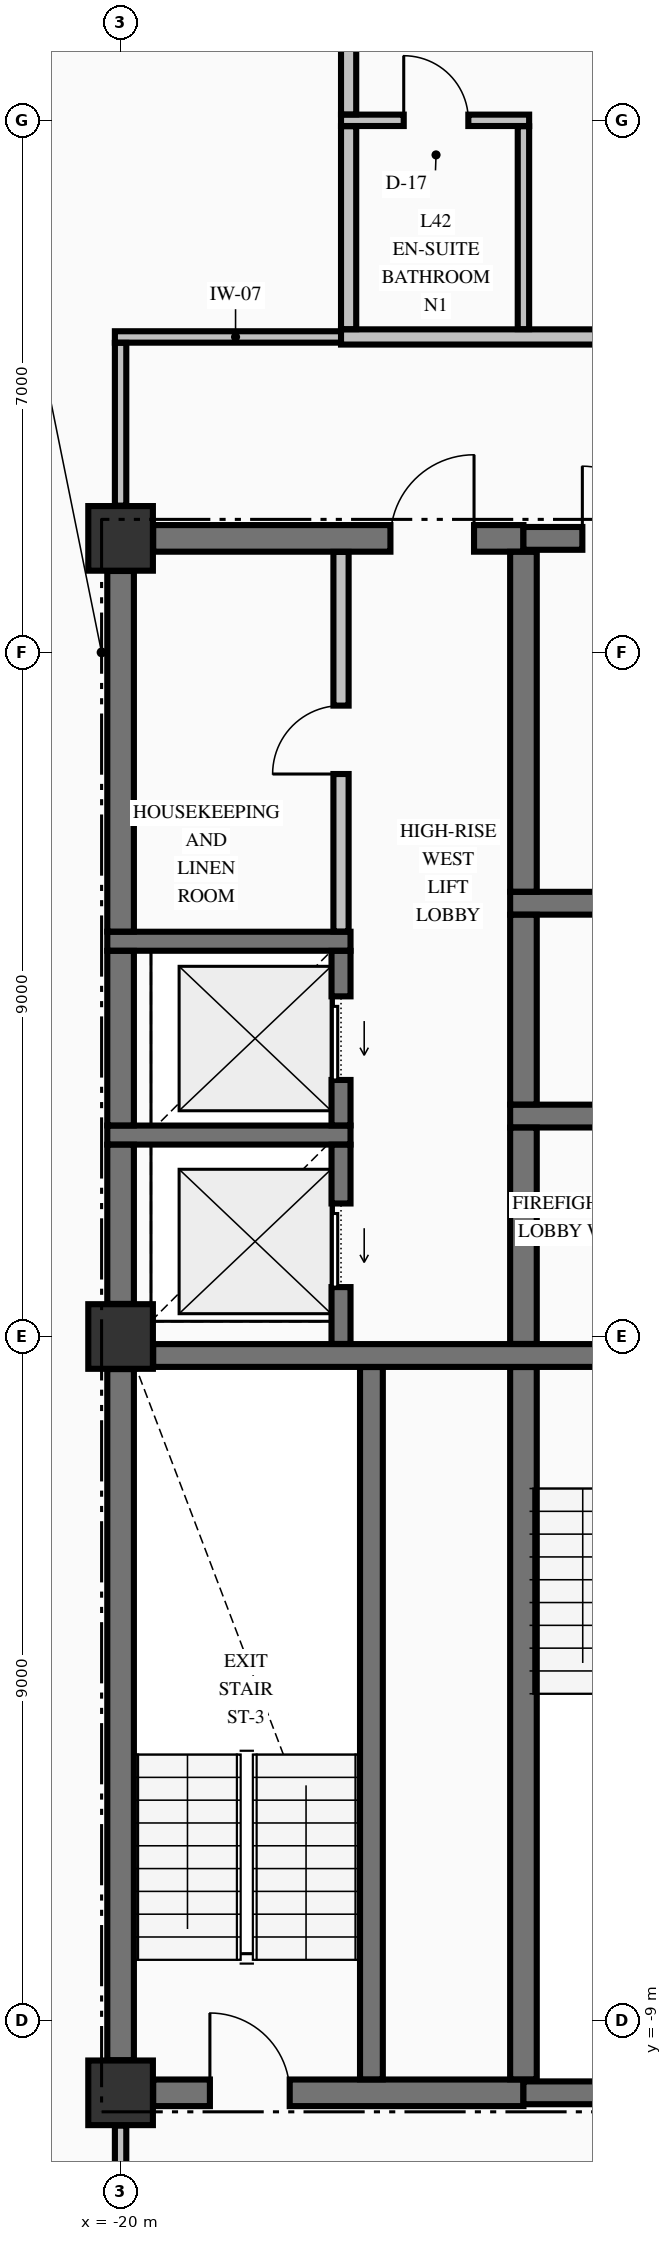
"""IFC4 building model, lengths in metres.
Left out: names, types, materials, properties, quantities, classifications, styles, units other than length and angle.
Written with IfcOpenShell. Run it as: python <this file> out.ifc"""

import sys

from ifc_helpers import new_model, si_unit, direction, frame, frame_2d, origin, origin_2d, place, context, subcontext, project, spatial, rectangle, extrude, element, fill, save


model = new_model("IFC4")
c1 = context("Model", 3, precision=1e-05, world=origin(), true_north=direction((0.0, 1.0)))
c2 = subcontext(c1, "Body", "Model", "MODEL_VIEW")
j1 = project(units=[si_unit("LENGTHUNIT", "METRE"), si_unit("PLANEANGLEUNIT", "RADIAN")], contexts=[c1])
p1 = place(None, origin())
s1 = spatial("IfcSite", under=j1, at=p1, CompositionType="ELEMENT")
p2 = place(p1, origin())
s2 = spatial("IfcBuilding", under=s1, at=p2, CompositionType="ELEMENT")
p3 = place(p2, frame((0.0, 0.0, 166.06)))
s3 = spatial("IfcBuildingStorey", under=s2, at=p3, CompositionType="ELEMENT", Elevation=166.06)
for number, where, z_axis, x_axis in (
    (1, (-20.0, -9.95, -0.25), (0.0, 0.0, 1.0), (1.0, 0.0, 0.0)),
    (2, (-20.0, 10.5, -0.25), (0.0, 0.0, 1.0), (1.0, 0.0, 0.0)),
    (3, (-20.0, 0.0, -0.25), (0.0, 0.0, 1.0), (1.0, 0.0, 0.0)),
):
    element("IfcColumn", number, at=place(p3, frame(where, z_axis=z_axis, x_axis=x_axis)), inside=s3, PredefinedType="COLUMN", context=c2, shape_type="SweptSolid", body=[
        extrude(rectangle(XDim=0.85, YDim=0.85, at=origin_2d()), origin(), (0.0, 0.0, 1.0), 3.4),
    ])
p4 = place(p3, frame((-19.571, -9.95, 0.0), z_axis=(0.0, 0.0, 1.0), x_axis=(1.0, 0.0, 0.0)))
e4 = element("IfcWall", 4, at=p4, inside=s3, PredefinedType="SHEAR", context=c2, shape_type="SweptSolid", body=[
    extrude(rectangle(XDim=4.871, YDim=0.35, at=frame_2d((2.436, 0.0))), origin(), (0.0, 0.0, 1.0), 3.15),
])
p5 = place(p4, frame((0.746, 0.0, 0.0)))
e5 = element("IfcOpeningElement", 5, at=p5, cuts=e4, PredefinedType="OPENING", context=c2, shape_type="SweptSolid", body=[
    extrude(rectangle(XDim=1.05, YDim=2.15, at=frame_2d((0.525, 1.075))), frame((0.0, 0.185, 0.0), z_axis=(0.0, -1.0, 0.0), x_axis=(1.0, 0.0, 0.0)), (0.0, 0.0, 1.0), 0.37),
])
p6 = place(p3, frame((-14.7, -9.95, 0.0), z_axis=(0.0, 0.0, 1.0), x_axis=(1.0, 0.0, 0.0)))
e6 = element("IfcWall", 6, at=p6, inside=s3, PredefinedType="SHEAR", context=c2, shape_type="SweptSolid", body=[
    extrude(rectangle(XDim=3.271, YDim=0.3, at=frame_2d((1.635, 0.0))), origin(), (0.0, 0.0, 1.0), 3.15),
])
p7 = place(p3, frame((-19.571, -0.25, 0.0), z_axis=(0.0, 0.0, 1.0), x_axis=(1.0, 0.0, 0.0)))
e7 = element("IfcWall", 7, at=p7, inside=s3, PredefinedType="SHEAR", context=c2, shape_type="SweptSolid", body=[
    extrude(rectangle(XDim=8.142, YDim=0.3, at=frame_2d((4.071, 0.0))), origin(), (0.0, 0.0, 1.0), 3.15),
])
p8 = place(p7, frame((5.871, 0.0, 0.0)))
e8 = element("IfcOpeningElement", 8, at=p8, cuts=e7, PredefinedType="OPENING", context=c2, shape_type="SweptSolid", body=[
    extrude(rectangle(XDim=1.1, YDim=2.15, at=frame_2d((0.55, 1.075))), frame((0.0, 0.16, 0.0), z_axis=(0.0, -1.0, 0.0), x_axis=(1.0, 0.0, 0.0)), (0.0, 0.0, 1.0), 0.32),
])
p9 = place(p3, frame((-20.175, 2.65, 0.0), z_axis=(0.0, 0.0, 1.0), x_axis=(1.0, 0.0, 0.0)))
e9 = element("IfcWall", 9, at=p9, inside=s3, PredefinedType="SOLIDWALL", context=c2, shape_type="SweptSolid", body=[
    extrude(rectangle(XDim=3.2, YDim=0.25, at=frame_2d((1.6, 0.0))), origin(), (0.0, 0.0, 1.0), 3.15),
])
p10 = place(p3, frame((-14.875, 2.9, 0.0), z_axis=(0.0, 0.0, 1.0), x_axis=(1.0, 0.0, 0.0)))
e10 = element("IfcWall", 10, at=p10, inside=s3, PredefinedType="SHEAR", context=c2, shape_type="SweptSolid", body=[
    extrude(rectangle(XDim=4.025, YDim=0.3, at=frame_2d((2.012, 0.0))), origin(), (0.0, 0.0, 1.0), 3.15),
])
p11 = place(p10, frame((2.075, 0.0, 0.0)))
e11 = element("IfcOpeningElement", 11, at=p11, cuts=e10, PredefinedType="OPENING", context=c2, shape_type="SweptSolid", body=[
    extrude(rectangle(XDim=1.1, YDim=2.2, at=frame_2d((0.55, 1.1))), frame((0.0, 0.16, 0.0), z_axis=(0.0, -1.0, 0.0), x_axis=(1.0, 0.0, 0.0)), (0.0, 0.0, 1.0), 0.32),
])
p12 = place(p3, frame((-20.175, 5.2, 0.0), z_axis=(0.0, 0.0, 1.0), x_axis=(1.0, 0.0, 0.0)))
e12 = element("IfcWall", 12, at=p12, inside=s3, PredefinedType="SOLIDWALL", context=c2, shape_type="SweptSolid", body=[
    extrude(rectangle(XDim=3.2, YDim=0.25, at=frame_2d((1.6, 0.0))), origin(), (0.0, 0.0, 1.0), 3.15),
])
p13 = place(p3, frame((-14.875, 5.7, 0.0), z_axis=(0.0, 0.0, 1.0), x_axis=(1.0, 0.0, 0.0)))
e13 = element("IfcWall", 13, at=p13, inside=s3, PredefinedType="SHEAR", context=c2, shape_type="SweptSolid", body=[
    extrude(rectangle(XDim=4.025, YDim=0.3, at=frame_2d((2.012, 0.0))), origin(), (0.0, 0.0, 1.0), 3.15),
])
p14 = place(p3, frame((-19.571, 10.5, 0.0), z_axis=(0.0, 0.0, 1.0), x_axis=(1.0, 0.0, 0.0)))
e14 = element("IfcWall", 14, at=p14, inside=s3, PredefinedType="SHEAR", context=c2, shape_type="SweptSolid", body=[
    extrude(rectangle(XDim=4.871, YDim=0.35, at=frame_2d((2.436, 0.0))), origin(), (0.0, 0.0, 1.0), 3.15),
])
p15 = place(p14, frame((3.121, 0.0, 0.0)))
e15 = element("IfcOpeningElement", 15, at=p15, cuts=e14, PredefinedType="OPENING", context=c2, shape_type="SweptSolid", body=[
    extrude(rectangle(XDim=1.1, YDim=2.15, at=frame_2d((0.55, 1.075))), frame((0.0, 0.185, 0.0), z_axis=(0.0, -1.0, 0.0), x_axis=(1.0, 0.0, 0.0)), (0.0, 0.0, 1.0), 0.37),
])
p16 = place(p3, frame((-14.7, 10.5, 0.0), z_axis=(0.0, 0.0, 1.0), x_axis=(1.0, 0.0, 0.0)))
e16 = element("IfcWall", 16, at=p16, inside=s3, PredefinedType="SHEAR", context=c2, shape_type="SweptSolid", body=[
    extrude(rectangle(XDim=3.271, YDim=0.3, at=frame_2d((1.635, 0.0))), origin(), (0.0, 0.0, 1.0), 3.15),
])
p17 = place(p16, frame((0.775, 0.0, 0.0)))
e17 = element("IfcOpeningElement", 17, at=p17, cuts=e16, PredefinedType="OPENING", context=c2, shape_type="SweptSolid", body=[
    extrude(rectangle(XDim=0.95, YDim=2.15, at=frame_2d((0.475, 1.075))), frame((0.0, 0.16, 0.0), z_axis=(0.0, -1.0, 0.0), x_axis=(1.0, 0.0, 0.0)), (0.0, 0.0, 1.0), 0.32),
])
p18 = place(p3, frame((-20.075, 13.15, 0.0), z_axis=(0.0, 0.0, 1.0), x_axis=(1.0, 0.0, 0.0)))
e18 = element("IfcWall", 18, at=p18, inside=s3, PredefinedType="PARTITIONING", context=c2, shape_type="SweptSolid", body=[
    extrude(rectangle(XDim=3.175, YDim=0.15, at=frame_2d((1.587, 0.0))), origin(), (0.0, 0.0, 1.0), 3.15),
])
p19 = place(p3, frame((-17.1, 13.15, 0.0), z_axis=(0.0, 0.0, 1.0), x_axis=(1.0, 0.0, 0.0)))
e19 = element("IfcWall", 19, at=p19, inside=s3, PredefinedType="PARTITIONING", context=c2, shape_type="SweptSolid", body=[
    extrude(rectangle(XDim=39.2, YDim=0.2, at=frame_2d((19.6, 0.0))), origin(), (0.0, 0.0, 1.0), 3.15),
])
p20 = place(p19, frame((3.575, 0.0, 0.0)))
e20 = element("IfcOpeningElement", 20, at=p20, cuts=e19, PredefinedType="OPENING", context=c2, shape_type="SweptSolid", body=[
    extrude(rectangle(XDim=0.95, YDim=2.15, at=frame_2d((0.475, 1.075))), frame((0.0, 0.11, 0.0), z_axis=(0.0, -1.0, 0.0), x_axis=(1.0, 0.0, 0.0)), (0.0, 0.0, 1.0), 0.22),
])
p21 = place(p19, frame((14.625, 0.0, 0.0)))
e21 = element("IfcOpeningElement", 21, at=p21, cuts=e19, PredefinedType="OPENING", context=c2, shape_type="SweptSolid", body=[
    extrude(rectangle(XDim=0.95, YDim=2.15, at=frame_2d((0.475, 1.075))), frame((0.0, 0.11, 0.0), z_axis=(0.0, -1.0, 0.0), x_axis=(1.0, 0.0, 0.0)), (0.0, 0.0, 1.0), 0.22),
])
p22 = place(p19, frame((21.125, 0.0, 0.0)))
e22 = element("IfcOpeningElement", 22, at=p22, cuts=e19, PredefinedType="OPENING", context=c2, shape_type="SweptSolid", body=[
    extrude(rectangle(XDim=0.95, YDim=2.15, at=frame_2d((0.475, 1.075))), frame((0.0, 0.11, 0.0), z_axis=(0.0, -1.0, 0.0), x_axis=(1.0, 0.0, 0.0)), (0.0, 0.0, 1.0), 0.22),
])
p23 = place(p19, frame((27.425, 0.0, 0.0)))
e23 = element("IfcOpeningElement", 23, at=p23, cuts=e19, PredefinedType="OPENING", context=c2, shape_type="SweptSolid", body=[
    extrude(rectangle(XDim=0.95, YDim=2.15, at=frame_2d((0.475, 1.075))), frame((0.0, 0.11, 0.0), z_axis=(0.0, -1.0, 0.0), x_axis=(1.0, 0.0, 0.0)), (0.0, 0.0, 1.0), 0.22),
])
p24 = place(p19, frame((34.605, 0.0, 0.0)))
e24 = element("IfcOpeningElement", 24, at=p24, cuts=e19, PredefinedType="OPENING", context=c2, shape_type="SweptSolid", body=[
    extrude(rectangle(XDim=0.95, YDim=2.15, at=frame_2d((0.475, 1.075))), frame((0.0, 0.11, 0.0), z_axis=(0.0, -1.0, 0.0), x_axis=(1.0, 0.0, 0.0)), (0.0, 0.0, 1.0), 0.22),
])
p25 = place(p3, frame((-17.1, 16.0, 0.0), z_axis=(0.0, 0.0, 1.0), x_axis=(1.0, 0.0, 0.0)))
e25 = element("IfcWall", 25, at=p25, inside=s3, PredefinedType="PARTITIONING", context=c2, shape_type="SweptSolid", body=[
    extrude(rectangle(XDim=2.475, YDim=0.15, at=frame_2d((1.238, 0.0))), origin(), (0.0, 0.0, 1.0), 3.15),
])
p26 = place(p25, frame((0.825, 0.0, 0.0)))
e26 = element("IfcOpeningElement", 26, at=p26, cuts=e25, PredefinedType="OPENING", context=c2, shape_type="SweptSolid", body=[
    extrude(rectangle(XDim=0.85, YDim=2.1, at=frame_2d((0.425, 1.05))), frame((0.0, 0.085, 0.0), z_axis=(0.0, -1.0, 0.0), x_axis=(1.0, 0.0, 0.0)), (0.0, 0.0, 1.0), 0.17),
])
p27 = place(p3, frame((-20.0, -9.521, 0.0), z_axis=(0.0, 0.0, 1.0), x_axis=(0.0, 1.0, 0.0)))
e27 = element("IfcWall", 27, at=p27, inside=s3, PredefinedType="SHEAR", context=c2, shape_type="SweptSolid", body=[
    extrude(rectangle(XDim=9.092, YDim=0.35, at=frame_2d((4.546, 0.0))), origin(), (0.0, 0.0, 1.0), 3.15),
])
p28 = place(p3, frame((-20.0, 0.429, 0.0), z_axis=(0.0, 0.0, 1.0), x_axis=(0.0, 1.0, 0.0)))
e28 = element("IfcWall", 28, at=p28, inside=s3, PredefinedType="SHEAR", context=c2, shape_type="SweptSolid", body=[
    extrude(rectangle(XDim=2.094, YDim=0.35, at=frame_2d((1.047, 0.0))), origin(), (0.0, 0.0, 1.0), 3.15),
])
p29 = place(p3, frame((-20.0, 2.777, 0.0), z_axis=(0.0, 0.0, 1.0), x_axis=(0.0, 1.0, 0.0)))
e29 = element("IfcWall", 29, at=p29, inside=s3, PredefinedType="SHEAR", context=c2, shape_type="SweptSolid", body=[
    extrude(rectangle(XDim=2.296, YDim=0.35, at=frame_2d((1.148, 0.0))), origin(), (0.0, 0.0, 1.0), 3.15),
])
p30 = place(p3, frame((-20.0, 5.327, 0.0), z_axis=(0.0, 0.0, 1.0), x_axis=(0.0, 1.0, 0.0)))
e30 = element("IfcWall", 30, at=p30, inside=s3, PredefinedType="SHEAR", context=c2, shape_type="SweptSolid", body=[
    extrude(rectangle(XDim=4.744, YDim=0.35, at=frame_2d((2.372, 0.0))), origin(), (0.0, 0.0, 1.0), 3.15),
])
p31 = place(p3, frame((-17.1, -0.098, 0.0), z_axis=(0.0, 0.0, 1.0), x_axis=(0.0, 1.0, 0.0)))
e31 = element("IfcWall", 31, at=p31, inside=s3, PredefinedType="SOLIDWALL", context=c2, shape_type="SweptSolid", body=[
    extrude(rectangle(XDim=2.621, YDim=0.25, at=frame_2d((1.311, 0.0))), origin(), (0.0, 0.0, 1.0), 3.15),
])
p32 = place(p31, frame((0.748, 0.0, 0.0)))
e32 = element("IfcOpeningElement", 32, at=p32, cuts=e31, PredefinedType="OPENING", context=c2, shape_type="SweptSolid", body=[
    extrude(rectangle(XDim=1.1, YDim=2.2, at=frame_2d((0.55, 1.1))), frame((0.0, 0.135, 0.0), z_axis=(0.0, -1.0, 0.0), x_axis=(1.0, 0.0, 0.0)), (0.0, 0.0, 1.0), 0.27),
])
p33 = place(p3, frame((-17.1, 2.777, 0.0), z_axis=(0.0, 0.0, 1.0), x_axis=(0.0, 1.0, 0.0)))
e33 = element("IfcWall", 33, at=p33, inside=s3, PredefinedType="SOLIDWALL", context=c2, shape_type="SweptSolid", body=[
    extrude(rectangle(XDim=2.296, YDim=0.25, at=frame_2d((1.148, 0.0))), origin(), (0.0, 0.0, 1.0), 3.15),
])
p34 = place(p33, frame((0.598, 0.0, 0.0)))
e34 = element("IfcOpeningElement", 34, at=p34, cuts=e33, PredefinedType="OPENING", context=c2, shape_type="SweptSolid", body=[
    extrude(rectangle(XDim=1.1, YDim=2.2, at=frame_2d((0.55, 1.1))), frame((0.0, 0.135, 0.0), z_axis=(0.0, -1.0, 0.0), x_axis=(1.0, 0.0, 0.0)), (0.0, 0.0, 1.0), 0.27),
])
p35 = place(p3, frame((-16.7, -9.773, 0.0), z_axis=(0.0, 0.0, 1.0), x_axis=(0.0, 1.0, 0.0)))
e35 = element("IfcWall", 35, at=p35, inside=s3, PredefinedType="SHEAR", context=c2, shape_type="SweptSolid", body=[
    extrude(rectangle(XDim=9.371, YDim=0.3, at=frame_2d((4.686, 0.0))), origin(), (0.0, 0.0, 1.0), 3.15),
])
p36 = place(p3, frame((-14.7, -9.773, 0.0), z_axis=(0.0, 0.0, 1.0), x_axis=(0.0, 1.0, 0.0)))
e36 = element("IfcWall", 36, at=p36, inside=s3, PredefinedType="SHEAR", context=c2, shape_type="SweptSolid", body=[
    extrude(rectangle(XDim=9.371, YDim=0.35, at=frame_2d((4.686, 0.0))), origin(), (0.0, 0.0, 1.0), 3.15),
])
p37 = place(p3, frame((-14.7, -0.098, 0.0), z_axis=(0.0, 0.0, 1.0), x_axis=(0.0, 1.0, 0.0)))
e37 = element("IfcWall", 37, at=p37, inside=s3, PredefinedType="SHEAR", context=c2, shape_type="SweptSolid", body=[
    extrude(rectangle(XDim=2.846, YDim=0.35, at=frame_2d((1.423, 0.0))), origin(), (0.0, 0.0, 1.0), 3.15),
])
p38 = place(p3, frame((-14.7, 3.052, 0.0), z_axis=(0.0, 0.0, 1.0), x_axis=(0.0, 1.0, 0.0)))
e38 = element("IfcWall", 38, at=p38, inside=s3, PredefinedType="SHEAR", context=c2, shape_type="SweptSolid", body=[
    extrude(rectangle(XDim=2.496, YDim=0.35, at=frame_2d((1.248, 0.0))), origin(), (0.0, 0.0, 1.0), 3.15),
])
p39 = place(p3, frame((-14.7, 5.852, 0.0), z_axis=(0.0, 0.0, 1.0), x_axis=(0.0, 1.0, 0.0)))
e39 = element("IfcWall", 39, at=p39, inside=s3, PredefinedType="SHEAR", context=c2, shape_type="SweptSolid", body=[
    extrude(rectangle(XDim=4.471, YDim=0.35, at=frame_2d((2.235, 0.0))), origin(), (0.0, 0.0, 1.0), 3.15),
])
p40 = place(p3, frame((-20.0, -12.222, 0.0), z_axis=(0.0, 0.0, 1.0), x_axis=(0.0, 1.0, 0.0)))
e40 = element("IfcWall", 40, at=p40, inside=s3, PredefinedType="PARTITIONING", context=c2, shape_type="SweptSolid", body=[
    extrude(rectangle(XDim=1.841, YDim=0.15, at=frame_2d((0.92, 0.0))), origin(), (0.0, 0.0, 1.0), 2.342),
])
p41 = place(p3, frame((-20.0, 10.931, 0.0), z_axis=(0.0, 0.0, 1.0), x_axis=(0.0, 1.0, 0.0)))
e41 = element("IfcWall", 41, at=p41, inside=s3, PredefinedType="PARTITIONING", context=c2, shape_type="SweptSolid", body=[
    extrude(rectangle(XDim=2.141, YDim=0.15, at=frame_2d((1.071, 0.0))), origin(), (0.0, 0.0, 1.0), 2.342),
])
p42 = place(p3, frame((-17.1, 5.328, 0.0), z_axis=(0.0, 0.0, 1.0), x_axis=(0.0, 1.0, 0.0)))
e42 = element("IfcWall", 42, at=p42, inside=s3, PredefinedType="PARTITIONING", context=c2, shape_type="SweptSolid", body=[
    extrude(rectangle(XDim=4.994, YDim=0.2, at=frame_2d((2.497, 0.0))), origin(), (0.0, 0.0, 1.0), 3.15),
])
p43 = place(p42, frame((2.072, 0.0, 0.0)))
e43 = element("IfcOpeningElement", 43, at=p43, cuts=e42, PredefinedType="OPENING", context=c2, shape_type="SweptSolid", body=[
    extrude(rectangle(XDim=0.9, YDim=2.15, at=frame_2d((0.45, 1.075))), frame((0.0, 0.11, 0.0), z_axis=(0.0, -1.0, 0.0), x_axis=(1.0, 0.0, 0.0)), (0.0, 0.0, 1.0), 0.22),
])
p44 = place(p3, frame((-17.0, 13.253, 0.0), z_axis=(0.0, 0.0, 1.0), x_axis=(0.0, 1.0, 0.0)))
e44 = element("IfcWall", 44, at=p44, inside=s3, PredefinedType="PARTITIONING", context=c2, shape_type="SweptSolid", body=[
    extrude(rectangle(XDim=2.669, YDim=0.2, at=frame_2d((1.334, 0.0))), origin(), (0.0, 0.0, 1.0), 3.15),
])
p45 = place(p3, frame((-17.0, 16.078, 0.0), z_axis=(0.0, 0.0, 1.0), x_axis=(0.0, 1.0, 0.0)))
e45 = element("IfcWall", 45, at=p45, inside=s3, PredefinedType="PARTITIONING", context=c2, shape_type="SweptSolid", body=[
    extrude(rectangle(XDim=2.916, YDim=0.2, at=frame_2d((1.458, 0.0))), origin(), (0.0, 0.0, 1.0), 3.15),
])
p46 = place(p3, frame((-14.7, 13.253, 0.0), z_axis=(0.0, 0.0, 1.0), x_axis=(0.0, 1.0, 0.0)))
e46 = element("IfcWall", 46, at=p46, inside=s3, PredefinedType="PARTITIONING", context=c2, shape_type="SweptSolid", body=[
    extrude(rectangle(XDim=2.669, YDim=0.15, at=frame_2d((1.334, 0.0))), origin(), (0.0, 0.0, 1.0), 3.15),
])
p47 = place(p17, origin())
e47 = element("IfcDoor", 47, at=p47, inside=s3, OperationType="SINGLE_SWING_LEFT", PredefinedType="DOOR", context=c2, shape_type="SweptSolid", body=[
    extrude(rectangle(XDim=0.95, YDim=2.15, at=frame_2d((0.475, 1.075))), frame((0.0, 0.025, 0.0), z_axis=(0.0, -1.0, 0.0), x_axis=(1.0, 0.0, 0.0)), (0.0, 0.0, 1.0), 0.05),
])
fill(e17, e47)
p48 = place(p5, origin())
e48 = element("IfcDoor", 48, at=p48, inside=s3, OperationType="SINGLE_SWING_LEFT", PredefinedType="DOOR", context=c2, shape_type="SweptSolid", body=[
    extrude(rectangle(XDim=1.05, YDim=2.15, at=frame_2d((0.525, 1.075))), frame((0.0, 0.025, 0.0), z_axis=(0.0, -1.0, 0.0), x_axis=(1.0, 0.0, 0.0)), (0.0, 0.0, 1.0), 0.05),
])
fill(e5, e48)
p49 = place(p32, origin())
e49 = element("IfcDoor", 49, at=p49, inside=s3, OperationType="SLIDING_TO_LEFT", PredefinedType="DOOR", context=c2, shape_type="SweptSolid", body=[
    extrude(rectangle(XDim=1.1, YDim=2.2, at=frame_2d((0.55, 1.1))), frame((0.0, 0.025, 0.0), z_axis=(0.0, -1.0, 0.0), x_axis=(1.0, 0.0, 0.0)), (0.0, 0.0, 1.0), 0.05),
])
fill(e32, e49)
p50 = place(p34, origin())
e50 = element("IfcDoor", 50, at=p50, inside=s3, OperationType="SLIDING_TO_LEFT", PredefinedType="DOOR", context=c2, shape_type="SweptSolid", body=[
    extrude(rectangle(XDim=1.1, YDim=2.2, at=frame_2d((0.55, 1.1))), frame((0.0, 0.025, 0.0), z_axis=(0.0, -1.0, 0.0), x_axis=(1.0, 0.0, 0.0)), (0.0, 0.0, 1.0), 0.05),
])
fill(e34, e50)
p51 = place(p15, origin())
e51 = element("IfcDoor", 51, at=p51, inside=s3, OperationType="SINGLE_SWING_RIGHT", PredefinedType="DOOR", context=c2, shape_type="SweptSolid", body=[
    extrude(rectangle(XDim=1.1, YDim=2.15, at=frame_2d((0.55, 1.075))), frame((0.0, 0.025, 0.0), z_axis=(0.0, -1.0, 0.0), x_axis=(1.0, 0.0, 0.0)), (0.0, 0.0, 1.0), 0.05),
])
fill(e15, e51)
p52 = place(p43, origin())
e52 = element("IfcDoor", 52, at=p52, inside=s3, OperationType="SINGLE_SWING_LEFT", PredefinedType="DOOR", context=c2, shape_type="SweptSolid", body=[
    extrude(rectangle(XDim=0.9, YDim=2.15, at=frame_2d((0.45, 1.075))), frame((0.0, 0.025, 0.0), z_axis=(0.0, -1.0, 0.0), x_axis=(1.0, 0.0, 0.0)), (0.0, 0.0, 1.0), 0.05),
])
fill(e43, e52)
p53 = place(p26, origin())
e53 = element("IfcDoor", 53, at=p53, inside=s3, OperationType="SINGLE_SWING_LEFT", PredefinedType="DOOR", context=c2, shape_type="SweptSolid", body=[
    extrude(rectangle(XDim=0.85, YDim=2.1, at=frame_2d((0.425, 1.05))), frame((0.0, 0.025, 0.0), z_axis=(0.0, -1.0, 0.0), x_axis=(1.0, 0.0, 0.0)), (0.0, 0.0, 1.0), 0.05),
])
fill(e26, e53)
save(model, sys.argv[1])
